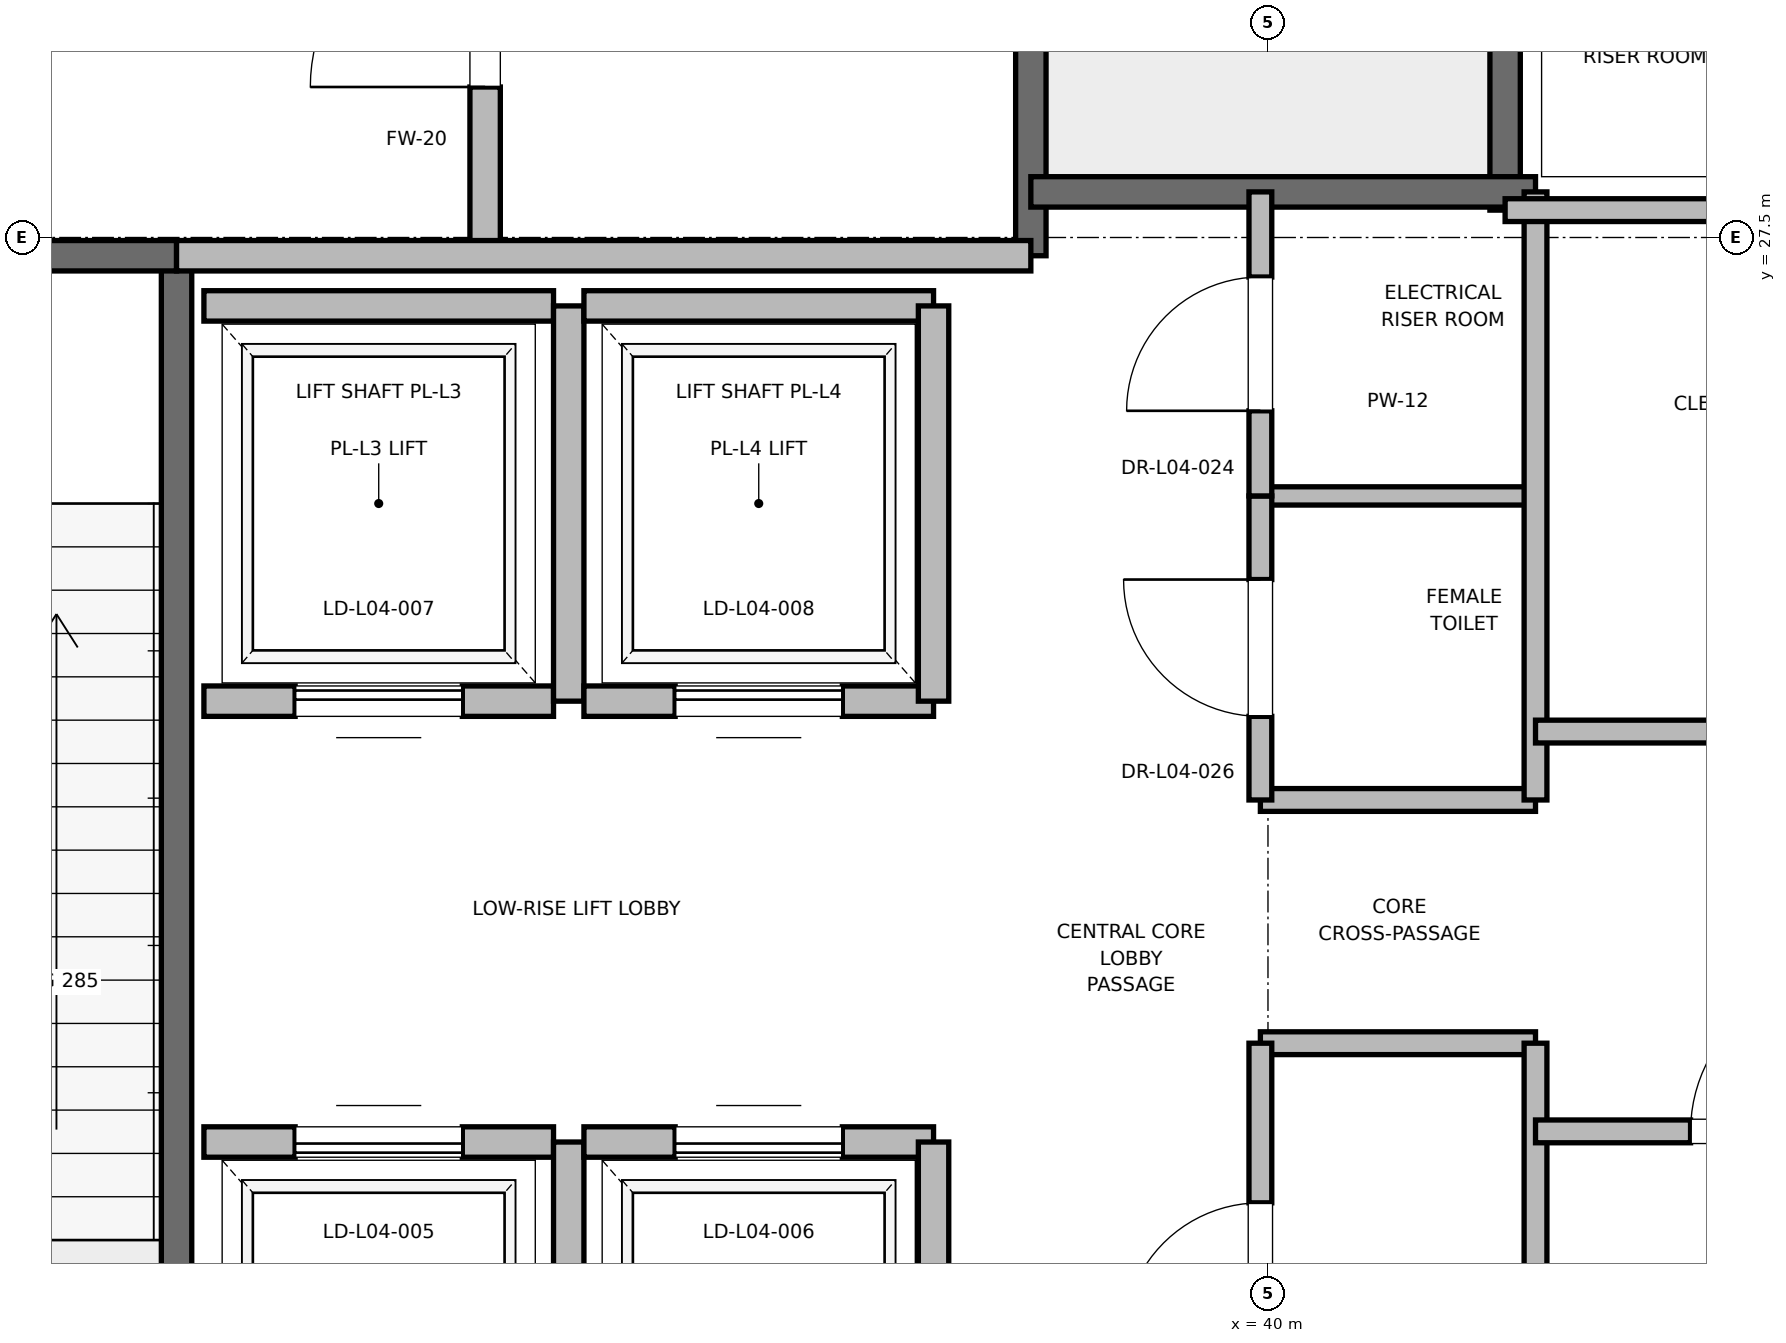
"""IFC4 building model, lengths in metres.
Left out: names, types, materials, properties, quantities, classifications, styles, units other than length and angle.
Written with IfcOpenShell. Run it as: python <this file> out.ifc"""

import sys

from ifc_helpers import new_model, si_unit, direction, frame, frame_2d, origin, place, context, subcontext, project, spatial, rectangle, extrude, element, fill, save


model = new_model("IFC4")
c1 = context("Model", 3, precision=1e-05, world=origin(), true_north=direction((0.0, 1.0)))
c2 = subcontext(c1, "Body", "Model", "MODEL_VIEW")
j1 = project(units=[si_unit("LENGTHUNIT", "METRE"), si_unit("PLANEANGLEUNIT", "RADIAN")], contexts=[c1])
p1 = place(None, origin())
s1 = spatial("IfcSite", under=j1, at=p1, CompositionType="ELEMENT")
p2 = place(p1, origin())
s2 = spatial("IfcBuilding", under=s1, at=p2, CompositionType="ELEMENT")
p3 = place(p2, frame((0.0, 0.0, 21.6)))
s3 = spatial("IfcBuildingStorey", under=s2, at=p3, CompositionType="ELEMENT", Elevation=21.6)
p4 = place(p3, frame((32.82, 18.6, 0.0), z_axis=(0.0, 0.0, 1.0), x_axis=(0.0, 1.0, 0.0)))
e1 = element("IfcWall", 1, at=p4, inside=s3, PredefinedType="SOLIDWALL", context=c2, shape_type="SweptSolid", body=[
    extrude(rectangle(XDim=8.78, YDim=0.2, at=frame_2d((4.39, 0.0))), origin(), (0.0, 0.0, 1.0), 5.76),
])
p5 = place(p3, frame((29.7, 27.38, 0.0), z_axis=(0.0, 0.0, 1.0), x_axis=(1.0, 0.0, 0.0)))
e2 = element("IfcWall", 2, at=p5, inside=s3, PredefinedType="SOLIDWALL", context=c2, shape_type="SweptSolid", body=[
    extrude(rectangle(XDim=3.12, YDim=0.2, at=frame_2d((1.56, 0.0))), origin(), (0.0, 0.0, 1.0), 5.76),
])
p6 = place(p5, frame((1.01, 0.0, 0.0)))
e3 = element("IfcOpeningElement", 3, at=p6, cuts=e2, PredefinedType="OPENING", context=c2, shape_type="SweptSolid", body=[
    extrude(rectangle(XDim=1.1, YDim=2.15, at=frame_2d((0.55, 1.075))), frame((0.0, 0.1, 0.0), z_axis=(0.0, -1.0, 0.0), x_axis=(1.0, 0.0, 0.0)), (0.0, 0.0, 1.0), 0.2),
])
p7 = place(p3, frame((38.44, 27.38, 0.0), z_axis=(0.0, 0.0, 1.0), x_axis=(0.0, 1.0, 0.0)))
e4 = element("IfcWall", 4, at=p7, inside=s3, PredefinedType="SOLIDWALL", context=c2, shape_type="SweptSolid", body=[
    extrude(rectangle(XDim=8.87, YDim=0.2, at=frame_2d((4.435, 0.0))), origin(), (0.0, 0.0, 1.0), 5.76),
])
p8 = place(p3, frame((41.56, 27.68, 0.0), z_axis=(0.0, 0.0, 1.0), x_axis=(0.0, 1.0, 0.0)))
e5 = element("IfcWall", 5, at=p8, inside=s3, PredefinedType="SOLIDWALL", context=c2, shape_type="SweptSolid", body=[
    extrude(rectangle(XDim=8.57, YDim=0.2, at=frame_2d((4.285, 0.0))), origin(), (0.0, 0.0, 1.0), 5.76),
])
p9 = place(p3, frame((38.44, 27.8, 0.0), z_axis=(0.0, 0.0, 1.0), x_axis=(1.0, 0.0, 0.0)))
e6 = element("IfcWall", 6, at=p9, inside=s3, PredefinedType="SOLIDWALL", context=c2, shape_type="SweptSolid", body=[
    extrude(rectangle(XDim=3.32, YDim=0.2, at=frame_2d((1.66, 0.0))), origin(), (0.0, 0.0, 1.0), 5.76),
])
p10 = place(p3, frame((34.85, 27.38, 0.0), z_axis=(0.0, 0.0, 1.0), x_axis=(0.0, 1.0, 0.0)))
e7 = element("IfcWall", 7, at=p10, inside=s3, PredefinedType="PARTITIONING", context=c2, shape_type="SweptSolid", body=[
    extrude(rectangle(XDim=3.37, YDim=0.2, at=frame_2d((1.685, 0.0))), origin(), (0.0, 0.0, 1.0), 5.76),
])
p11 = place(p10, frame((1.11, 0.0, 0.0)))
e8 = element("IfcOpeningElement", 8, at=p11, cuts=e7, PredefinedType="OPENING", context=c2, shape_type="SweptSolid", body=[
    extrude(rectangle(XDim=1.15, YDim=2.2, at=frame_2d((0.575, 1.1))), frame((0.0, 0.1, 0.0), z_axis=(0.0, -1.0, 0.0), x_axis=(1.0, 0.0, 0.0)), (0.0, 0.0, 1.0), 0.2),
])
p12 = place(p3, frame((32.82, 27.38, 0.0), z_axis=(0.0, 0.0, 1.0), x_axis=(1.0, 0.0, 0.0)))
e9 = element("IfcWall", 9, at=p12, inside=s3, PredefinedType="PARTITIONING", context=c2, shape_type="SweptSolid", body=[
    extrude(rectangle(XDim=5.62, YDim=0.2, at=frame_2d((2.81, 0.0))), origin(), (0.0, 0.0, 1.0), 5.76),
])
p13 = place(p3, frame((35.3, 21.55, 0.0), z_axis=(0.0, 0.0, 1.0), x_axis=(-1.0, 0.0, 0.0)))
e10 = element("IfcWall", 10, at=p13, inside=s3, PredefinedType="SOLIDWALL", context=c2, shape_type="SweptSolid", body=[
    extrude(rectangle(XDim=2.3, YDim=0.2, at=frame_2d((1.15, 0.0))), origin(), (0.0, 0.0, 1.0), 5.76),
])
p14 = place(p13, frame((0.6, 0.0, 0.0)))
e11 = element("IfcOpeningElement", 11, at=p14, cuts=e10, PredefinedType="OPENING", context=c2, shape_type="SweptSolid", body=[
    extrude(rectangle(XDim=1.1, YDim=2.2, at=frame_2d((0.55, 1.1))), frame((0.0, 0.1, 0.0), z_axis=(0.0, -1.0, 0.0), x_axis=(1.0, 0.0, 0.0)), (0.0, 0.0, 1.0), 0.2),
])
p15 = place(p3, frame((35.4, 18.95, 0.0), z_axis=(0.0, 0.0, 1.0), x_axis=(0.0, 1.0, 0.0)))
e12 = element("IfcWall", 12, at=p15, inside=s3, PredefinedType="SOLIDWALL", context=c2, shape_type="SweptSolid", body=[
    extrude(rectangle(XDim=2.6, YDim=0.2, at=frame_2d((1.3, 0.0))), origin(), (0.0, 0.0, 1.0), 5.76),
])
p16 = place(p3, frame((37.8, 21.55, 0.0), z_axis=(0.0, 0.0, 1.0), x_axis=(-1.0, 0.0, 0.0)))
e13 = element("IfcWall", 13, at=p16, inside=s3, PredefinedType="SOLIDWALL", context=c2, shape_type="SweptSolid", body=[
    extrude(rectangle(XDim=2.3, YDim=0.2, at=frame_2d((1.15, 0.0))), origin(), (0.0, 0.0, 1.0), 5.76),
])
p17 = place(p16, frame((0.6, 0.0, 0.0)))
e14 = element("IfcOpeningElement", 14, at=p17, cuts=e13, PredefinedType="OPENING", context=c2, shape_type="SweptSolid", body=[
    extrude(rectangle(XDim=1.1, YDim=2.2, at=frame_2d((0.55, 1.1))), frame((0.0, 0.1, 0.0), z_axis=(0.0, -1.0, 0.0), x_axis=(1.0, 0.0, 0.0)), (0.0, 0.0, 1.0), 0.2),
])
p18 = place(p3, frame((37.8, 18.95, 0.0), z_axis=(0.0, 0.0, 1.0), x_axis=(0.0, 1.0, 0.0)))
e15 = element("IfcWall", 15, at=p18, inside=s3, PredefinedType="SOLIDWALL", context=c2, shape_type="SweptSolid", body=[
    extrude(rectangle(XDim=2.6, YDim=0.2, at=frame_2d((1.3, 0.0))), origin(), (0.0, 0.0, 1.0), 4.54),
])
p19 = place(p3, frame((33.0, 24.45, 0.0), z_axis=(0.0, 0.0, 1.0), x_axis=(1.0, 0.0, 0.0)))
e16 = element("IfcWall", 16, at=p19, inside=s3, PredefinedType="SOLIDWALL", context=c2, shape_type="SweptSolid", body=[
    extrude(rectangle(XDim=2.3, YDim=0.2, at=frame_2d((1.15, 0.0))), origin(), (0.0, 0.0, 1.0), 5.76),
])
p20 = place(p19, frame((0.6, 0.0, 0.0)))
e17 = element("IfcOpeningElement", 17, at=p20, cuts=e16, PredefinedType="OPENING", context=c2, shape_type="SweptSolid", body=[
    extrude(rectangle(XDim=1.1, YDim=2.2, at=frame_2d((0.55, 1.1))), frame((0.0, 0.1, 0.0), z_axis=(0.0, -1.0, 0.0), x_axis=(1.0, 0.0, 0.0)), (0.0, 0.0, 1.0), 0.2),
])
p21 = place(p3, frame((35.3, 27.05, 0.0), z_axis=(0.0, 0.0, 1.0), x_axis=(-1.0, 0.0, 0.0)))
e18 = element("IfcWall", 18, at=p21, inside=s3, PredefinedType="SOLIDWALL", context=c2, shape_type="SweptSolid", body=[
    extrude(rectangle(XDim=2.3, YDim=0.2, at=frame_2d((1.15, 0.0))), origin(), (0.0, 0.0, 1.0), 5.76),
])
p22 = place(p3, frame((35.4, 24.45, 0.0), z_axis=(0.0, 0.0, 1.0), x_axis=(0.0, 1.0, 0.0)))
e19 = element("IfcWall", 19, at=p22, inside=s3, PredefinedType="SOLIDWALL", context=c2, shape_type="SweptSolid", body=[
    extrude(rectangle(XDim=2.6, YDim=0.2, at=frame_2d((1.3, 0.0))), origin(), (0.0, 0.0, 1.0), 5.76),
])
p23 = place(p3, frame((35.5, 24.45, 0.0), z_axis=(0.0, 0.0, 1.0), x_axis=(1.0, 0.0, 0.0)))
e20 = element("IfcWall", 20, at=p23, inside=s3, PredefinedType="SOLIDWALL", context=c2, shape_type="SweptSolid", body=[
    extrude(rectangle(XDim=2.3, YDim=0.2, at=frame_2d((1.15, 0.0))), origin(), (0.0, 0.0, 1.0), 5.76),
])
p24 = place(p23, frame((0.6, 0.0, 0.0)))
e21 = element("IfcOpeningElement", 21, at=p24, cuts=e20, PredefinedType="OPENING", context=c2, shape_type="SweptSolid", body=[
    extrude(rectangle(XDim=1.1, YDim=2.2, at=frame_2d((0.55, 1.1))), frame((0.0, 0.1, 0.0), z_axis=(0.0, -1.0, 0.0), x_axis=(1.0, 0.0, 0.0)), (0.0, 0.0, 1.0), 0.2),
])
p25 = place(p3, frame((37.8, 27.05, 0.0), z_axis=(0.0, 0.0, 1.0), x_axis=(-1.0, 0.0, 0.0)))
e22 = element("IfcWall", 22, at=p25, inside=s3, PredefinedType="SOLIDWALL", context=c2, shape_type="SweptSolid", body=[
    extrude(rectangle(XDim=2.3, YDim=0.2, at=frame_2d((1.15, 0.0))), origin(), (0.0, 0.0, 1.0), 5.76),
])
p26 = place(p3, frame((37.8, 24.45, 0.0), z_axis=(0.0, 0.0, 1.0), x_axis=(0.0, 1.0, 0.0)))
e23 = element("IfcWall", 23, at=p26, inside=s3, PredefinedType="SOLIDWALL", context=c2, shape_type="SweptSolid", body=[
    extrude(rectangle(XDim=2.6, YDim=0.2, at=frame_2d((1.3, 0.0))), origin(), (0.0, 0.0, 1.0), 5.76),
])
for number, where, z_axis, x_axis in (
    (24, (39.95, 22.2, 0.0), (0.0, 0.0, 1.0), (1.0, 0.0, 0.0)),
    (25, (39.95, 23.8, 0.0), (0.0, 0.0, 1.0), (1.0, 0.0, 0.0)),
):
    element("IfcWall", number, at=place(p3, frame(where, z_axis=z_axis, x_axis=x_axis)), inside=s3, PredefinedType="PARTITIONING", context=c2, shape_type="SweptSolid", body=[
        extrude(rectangle(XDim=1.81, YDim=0.15, at=frame_2d((0.905, 0.0))), origin(), (0.0, 0.0, 1.0), 2.85),
    ])
p27 = place(p3, frame((39.95, 25.8, 0.0), z_axis=(0.0, 0.0, 1.0), x_axis=(1.0, 0.0, 0.0)))
e26 = element("IfcWall", 26, at=p27, inside=s3, PredefinedType="PARTITIONING", context=c2, shape_type="SweptSolid", body=[
    extrude(rectangle(XDim=1.81, YDim=0.12, at=frame_2d((0.905, 0.0))), origin(), (0.0, 0.0, 1.0), 2.85),
])
p28 = place(p3, frame((41.76, 18.6, 0.0), z_axis=(0.0, 0.0, 1.0), x_axis=(0.0, 1.0, 0.0)))
e27 = element("IfcWall", 27, at=p28, inside=s3, PredefinedType="PARTITIONING", context=c2, shape_type="SweptSolid", body=[
    extrude(rectangle(XDim=3.6, YDim=0.15, at=frame_2d((1.8, 0.0))), origin(), (0.0, 0.0, 1.0), 2.85),
])
p29 = place(p3, frame((41.76, 23.8, 0.0), z_axis=(0.0, 0.0, 1.0), x_axis=(0.0, 1.0, 0.0)))
e28 = element("IfcWall", 28, at=p29, inside=s3, PredefinedType="PARTITIONING", context=c2, shape_type="SweptSolid", body=[
    extrude(rectangle(XDim=4.0, YDim=0.15, at=frame_2d((2.0, 0.0))), origin(), (0.0, 0.0, 1.0), 2.85),
])
p30 = place(p3, frame((39.95, 19.2, 0.0), z_axis=(0.0, 0.0, 1.0), x_axis=(0.0, 1.0, 0.0)))
e29 = element("IfcWall", 29, at=p30, inside=s3, PredefinedType="PARTITIONING", context=c2, shape_type="SweptSolid", body=[
    extrude(rectangle(XDim=3.0, YDim=0.15, at=frame_2d((1.5, 0.0))), origin(), (0.0, 0.0, 1.0), 2.85),
])
p31 = place(p30, frame((1.05, 0.0, 0.0)))
e30 = element("IfcOpeningElement", 30, at=p31, cuts=e29, PredefinedType="OPENING", context=c2, shape_type="SweptSolid", body=[
    extrude(rectangle(XDim=0.9, YDim=2.1, at=frame_2d((0.45, 1.05))), frame((0.0, 0.075, 0.0), z_axis=(0.0, -1.0, 0.0), x_axis=(1.0, 0.0, 0.0)), (0.0, 0.0, 1.0), 0.15),
])
p32 = place(p3, frame((39.95, 23.8, 0.0), z_axis=(0.0, 0.0, 1.0), x_axis=(0.0, 1.0, 0.0)))
e31 = element("IfcWall", 31, at=p32, inside=s3, PredefinedType="PARTITIONING", context=c2, shape_type="SweptSolid", body=[
    extrude(rectangle(XDim=2.0, YDim=0.15, at=frame_2d((1.0, 0.0))), origin(), (0.0, 0.0, 1.0), 2.85),
])
p33 = place(p32, frame((0.55, 0.0, 0.0)))
e32 = element("IfcOpeningElement", 32, at=p33, cuts=e31, PredefinedType="OPENING", context=c2, shape_type="SweptSolid", body=[
    extrude(rectangle(XDim=0.9, YDim=2.1, at=frame_2d((0.45, 1.05))), frame((0.0, 0.075, 0.0), z_axis=(0.0, -1.0, 0.0), x_axis=(1.0, 0.0, 0.0)), (0.0, 0.0, 1.0), 0.15),
])
p34 = place(p3, frame((39.95, 25.8, 0.0), z_axis=(0.0, 0.0, 1.0), x_axis=(0.0, 1.0, 0.0)))
e33 = element("IfcWall", 33, at=p34, inside=s3, PredefinedType="PARTITIONING", context=c2, shape_type="SweptSolid", body=[
    extrude(rectangle(XDim=2.0, YDim=0.15, at=frame_2d((1.0, 0.0))), origin(), (0.0, 0.0, 1.0), 2.85),
])
p35 = place(p34, frame((0.56, 0.0, 0.0)))
e34 = element("IfcOpeningElement", 34, at=p35, cuts=e33, PredefinedType="OPENING", context=c2, shape_type="SweptSolid", body=[
    extrude(rectangle(XDim=0.88, YDim=2.1, at=frame_2d((0.44, 1.05))), frame((0.0, 0.075, 0.0), z_axis=(0.0, -1.0, 0.0), x_axis=(1.0, 0.0, 0.0)), (0.0, 0.0, 1.0), 0.15),
])
p36 = place(p3, frame((41.56, 27.68, 0.0), z_axis=(0.0, 0.0, 1.0), x_axis=(1.0, 0.0, 0.0)))
e35 = element("IfcWall", 35, at=p36, inside=s3, PredefinedType="PARTITIONING", context=c2, shape_type="SweptSolid", body=[
    extrude(rectangle(XDim=3.59, YDim=0.15, at=frame_2d((1.795, 0.0))), origin(), (0.0, 0.0, 1.0), 2.85),
])
p37 = place(p3, frame((41.76, 21.62, 0.0), z_axis=(0.0, 0.0, 1.0), x_axis=(1.0, 0.0, 0.0)))
e36 = element("IfcWall", 36, at=p37, inside=s3, PredefinedType="PARTITIONING", context=c2, shape_type="SweptSolid", body=[
    extrude(rectangle(XDim=3.04, YDim=0.15, at=frame_2d((1.52, 0.0))), origin(), (0.0, 0.0, 1.0), 2.85),
])
p38 = place(p37, frame((1.02, 0.0, 0.0)))
e37 = element("IfcOpeningElement", 37, at=p38, cuts=e36, PredefinedType="OPENING", context=c2, shape_type="SweptSolid", body=[
    extrude(rectangle(XDim=1.0, YDim=2.15, at=frame_2d((0.5, 1.075))), frame((0.0, 0.075, 0.0), z_axis=(0.0, -1.0, 0.0), x_axis=(1.0, 0.0, 0.0)), (0.0, 0.0, 1.0), 0.15),
])
p39 = place(p3, frame((41.76, 24.25, 0.0), z_axis=(0.0, 0.0, 1.0), x_axis=(1.0, 0.0, 0.0)))
e38 = element("IfcWall", 38, at=p39, inside=s3, PredefinedType="PARTITIONING", context=c2, shape_type="SweptSolid", body=[
    extrude(rectangle(XDim=3.39, YDim=0.15, at=frame_2d((1.695, 0.0))), origin(), (0.0, 0.0, 1.0), 2.85),
])
p40 = place(p39, frame((1.255, 0.0, 0.0)))
e39 = element("IfcOpeningElement", 39, at=p40, cuts=e38, PredefinedType="OPENING", context=c2, shape_type="SweptSolid", body=[
    extrude(rectangle(XDim=0.88, YDim=2.1, at=frame_2d((0.44, 1.05))), frame((0.0, 0.075, 0.0), z_axis=(0.0, -1.0, 0.0), x_axis=(1.0, 0.0, 0.0)), (0.0, 0.0, 1.0), 0.15),
])
p41 = place(p11, origin())
e40 = element("IfcDoor", 40, at=p41, inside=s3, OperationType="SINGLE_SWING_LEFT", PredefinedType="DOOR", context=c2, shape_type="SweptSolid", body=[
    extrude(rectangle(XDim=1.15, YDim=2.2, at=frame_2d((0.575, 1.1))), frame((0.0, 0.025, 0.0), z_axis=(0.0, -1.0, 0.0), x_axis=(1.0, 0.0, 0.0)), (0.0, 0.0, 1.0), 0.05),
])
fill(e8, e40)
p42 = place(p14, origin())
e41 = element("IfcDoor", 41, at=p42, inside=s3, OperationType="SLIDING_TO_RIGHT", PredefinedType="DOOR", context=c2, shape_type="SweptSolid", body=[
    extrude(rectangle(XDim=1.1, YDim=2.2, at=frame_2d((0.55, 1.1))), frame((0.0, 0.025, 0.0), z_axis=(0.0, -1.0, 0.0), x_axis=(1.0, 0.0, 0.0)), (0.0, 0.0, 1.0), 0.05),
])
fill(e11, e41)
p43 = place(p17, origin())
e42 = element("IfcDoor", 42, at=p43, inside=s3, OperationType="SLIDING_TO_RIGHT", PredefinedType="DOOR", context=c2, shape_type="SweptSolid", body=[
    extrude(rectangle(XDim=1.1, YDim=2.2, at=frame_2d((0.55, 1.1))), frame((0.0, 0.025, 0.0), z_axis=(0.0, -1.0, 0.0), x_axis=(1.0, 0.0, 0.0)), (0.0, 0.0, 1.0), 0.05),
])
fill(e14, e42)
p44 = place(p20, origin())
e43 = element("IfcDoor", 43, at=p44, inside=s3, OperationType="SLIDING_TO_RIGHT", PredefinedType="DOOR", context=c2, shape_type="SweptSolid", body=[
    extrude(rectangle(XDim=1.1, YDim=2.2, at=frame_2d((0.55, 1.1))), frame((0.0, 0.025, 0.0), z_axis=(0.0, -1.0, 0.0), x_axis=(1.0, 0.0, 0.0)), (0.0, 0.0, 1.0), 0.05),
])
fill(e17, e43)
p45 = place(p24, origin())
e44 = element("IfcDoor", 44, at=p45, inside=s3, OperationType="SLIDING_TO_RIGHT", PredefinedType="DOOR", context=c2, shape_type="SweptSolid", body=[
    extrude(rectangle(XDim=1.1, YDim=2.2, at=frame_2d((0.55, 1.1))), frame((0.0, 0.025, 0.0), z_axis=(0.0, -1.0, 0.0), x_axis=(1.0, 0.0, 0.0)), (0.0, 0.0, 1.0), 0.05),
])
fill(e21, e44)
p46 = place(p31, origin())
e45 = element("IfcDoor", 45, at=p46, inside=s3, OperationType="SINGLE_SWING_LEFT", PredefinedType="DOOR", context=c2, shape_type="SweptSolid", body=[
    extrude(rectangle(XDim=0.9, YDim=2.1, at=frame_2d((0.45, 1.05))), frame((0.0, 0.025, 0.0), z_axis=(0.0, -1.0, 0.0), x_axis=(1.0, 0.0, 0.0)), (0.0, 0.0, 1.0), 0.05),
])
fill(e30, e45)
p47 = place(p33, origin())
e46 = element("IfcDoor", 46, at=p47, inside=s3, OperationType="SINGLE_SWING_RIGHT", PredefinedType="DOOR", context=c2, shape_type="SweptSolid", body=[
    extrude(rectangle(XDim=0.9, YDim=2.1, at=frame_2d((0.45, 1.05))), frame((0.0, 0.025, 0.0), z_axis=(0.0, -1.0, 0.0), x_axis=(1.0, 0.0, 0.0)), (0.0, 0.0, 1.0), 0.05),
])
fill(e32, e46)
p48 = place(p35, origin())
e47 = element("IfcDoor", 47, at=p48, inside=s3, OperationType="SINGLE_SWING_LEFT", PredefinedType="DOOR", context=c2, shape_type="SweptSolid", body=[
    extrude(rectangle(XDim=0.88, YDim=2.1, at=frame_2d((0.44, 1.05))), frame((0.0, 0.025, 0.0), z_axis=(0.0, -1.0, 0.0), x_axis=(1.0, 0.0, 0.0)), (0.0, 0.0, 1.0), 0.05),
])
fill(e34, e47)
p49 = place(p38, origin())
e48 = element("IfcDoor", 48, at=p49, inside=s3, OperationType="SINGLE_SWING_RIGHT", PredefinedType="DOOR", context=c2, shape_type="SweptSolid", body=[
    extrude(rectangle(XDim=1.0, YDim=2.15, at=frame_2d((0.5, 1.075))), frame((0.0, 0.025, 0.0), z_axis=(0.0, -1.0, 0.0), x_axis=(1.0, 0.0, 0.0)), (0.0, 0.0, 1.0), 0.05),
])
fill(e37, e48)
save(model, sys.argv[1])
